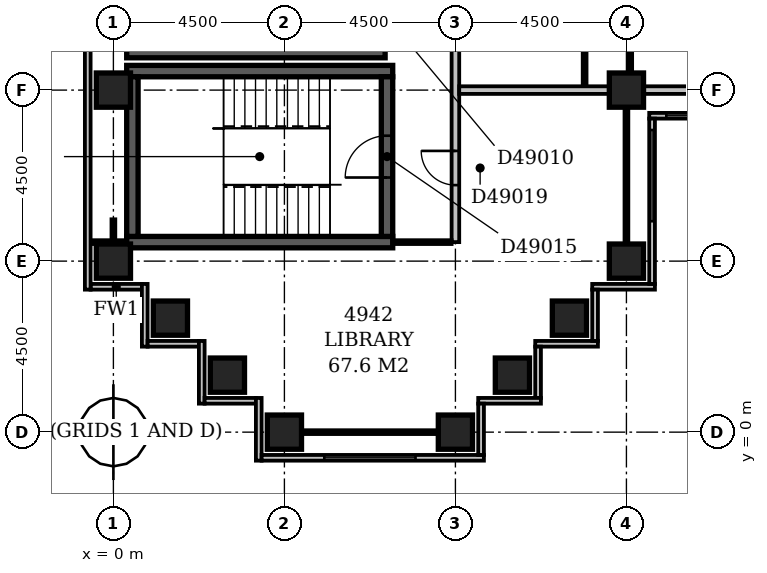
"""IFC4 building model, lengths in metres.
Left out: names, types, materials, properties, quantities, classifications, styles, units other than length and angle.
Written with IfcOpenShell. Run it as: python <this file> out.ifc"""

import sys

from ifc_helpers import new_model, si_unit, direction, frame, frame_2d, origin, origin_2d, place, context, subcontext, project, spatial, rectangle, extrude, element, fill, save


model = new_model("IFC4")
c1 = context("Model", 3, precision=1e-05, world=origin(), true_north=direction((0.0, 1.0)))
c2 = subcontext(c1, "Body", "Model", "MODEL_VIEW")
j1 = project(units=[si_unit("LENGTHUNIT", "METRE"), si_unit("PLANEANGLEUNIT", "RADIAN")], contexts=[c1])
p1 = place(None, origin())
s1 = spatial("IfcSite", under=j1, at=p1, CompositionType="ELEMENT")
p2 = place(p1, origin())
s2 = spatial("IfcBuilding", under=s1, at=p2, CompositionType="ELEMENT")
p3 = place(p2, frame((0.0, 0.0, 193.4)))
s3 = spatial("IfcBuildingStorey", under=s2, at=p3, CompositionType="ELEMENT", Elevation=193.4)
for number, where, z_axis, x_axis in (
    (1, (0.35, 5.0, -0.3), (0.0, 0.0, 1.0), (1.0, 0.0, 0.0)),
    (2, (0.35, 9.5, -0.3), (0.0, 0.0, 1.0), (1.0, 0.0, 0.0)),
):
    element("IfcWall", number, at=place(p3, frame(where, z_axis=z_axis, x_axis=x_axis)), inside=s3, PredefinedType="SHEAR", context=c2, shape_type="SweptSolid", body=[
        extrude(rectangle(XDim=7.0, YDim=0.3, at=frame_2d((3.5, 0.0))), origin(), (0.0, 0.0, 1.0), 3.6),
    ])
p4 = place(p3, frame((0.35, 10.0, -0.3), z_axis=(0.0, 0.0, 1.0), x_axis=(1.0, 0.0, 0.0)))
e3 = element("IfcWall", 3, at=p4, inside=s3, PredefinedType="SHEAR", context=c2, shape_type="SweptSolid", body=[
    extrude(rectangle(XDim=6.8, YDim=0.3, at=frame_2d((3.4, 0.0))), origin(), (0.0, 0.0, 1.0), 3.6),
])
p5 = place(p3, frame((0.5, 5.15, -0.3), z_axis=(0.0, 0.0, 1.0), x_axis=(0.0, 1.0, 0.0)))
e4 = element("IfcWall", 4, at=p5, inside=s3, PredefinedType="SHEAR", context=c2, shape_type="SweptSolid", body=[
    extrude(rectangle(XDim=4.2, YDim=0.3, at=frame_2d((2.1, 0.0))), origin(), (0.0, 0.0, 1.0), 3.6),
])
p6 = place(p3, frame((7.2, 5.15, -0.3), z_axis=(0.0, 0.0, 1.0), x_axis=(0.0, 1.0, 0.0)))
e5 = element("IfcWall", 5, at=p6, inside=s3, PredefinedType="SHEAR", context=c2, shape_type="SweptSolid", body=[
    extrude(rectangle(XDim=4.2, YDim=0.3, at=frame_2d((2.1, 0.0))), origin(), (0.0, 0.0, 1.0), 3.6),
])
p7 = place(p6, frame((1.55, 0.0, 0.3)))
e6 = element("IfcOpeningElement", 6, at=p7, cuts=e5, PredefinedType="OPENING", context=c2, shape_type="SweptSolid", body=[
    extrude(rectangle(XDim=1.1, YDim=2.1, at=frame_2d((0.55, 1.05))), frame((0.0, 0.162, 0.0), z_axis=(0.0, -1.0, 0.0), x_axis=(1.0, 0.0, 0.0)), (0.0, 0.0, 1.0), 0.324),
])
for number, where, z_axis, x_axis in (
    (7, (4.5, 0.0, -0.3), (0.0, 0.0, 1.0), (1.0, 0.0, 0.0)),
    (8, (9.0, 0.0, -0.3), (0.0, 0.0, 1.0), (1.0, 0.0, 0.0)),
    (9, (3.0, 1.5, -0.3), (0.0, 0.0, 1.0), (1.0, 0.0, 0.0)),
    (10, (10.5, 1.5, -0.3), (0.0, 0.0, 1.0), (1.0, 0.0, 0.0)),
    (11, (1.5, 3.0, -0.3), (0.0, 0.0, 1.0), (1.0, 0.0, 0.0)),
    (12, (12.0, 3.0, -0.3), (0.0, 0.0, 1.0), (1.0, 0.0, 0.0)),
    (13, (0.0, 4.5, -0.3), (0.0, 0.0, 1.0), (1.0, 0.0, 0.0)),
    (14, (13.5, 4.5, -0.3), (0.0, 0.0, 1.0), (1.0, 0.0, 0.0)),
    (15, (0.0, 9.0, -0.3), (0.0, 0.0, 1.0), (1.0, 0.0, 0.0)),
    (16, (13.5, 9.0, -0.3), (0.0, 0.0, 1.0), (1.0, 0.0, 0.0)),
):
    element("IfcColumn", number, at=place(p3, frame(where, z_axis=z_axis, x_axis=x_axis)), inside=s3, PredefinedType="COLUMN", context=c2, shape_type="SweptSolid", body=[
        extrude(rectangle(XDim=0.9, YDim=0.9, at=origin_2d()), origin(), (0.0, 0.0, 1.0), 3.6),
    ])
p8 = place(p3, frame((-0.6, 3.825, 0.0), z_axis=(0.0, 0.0, 1.0), x_axis=(1.0, 0.0, 0.0)))
e17 = element("IfcWall", 17, at=p8, inside=s3, PredefinedType="STANDARD", context=c2, shape_type="SweptSolid", body=[
    extrude(rectangle(XDim=1.35, YDim=0.15, at=frame_2d((0.675, 0.0))), origin(), (0.0, 0.0, 1.0), 2.7),
])
p9 = place(p3, frame((0.825, 3.9, 0.0), z_axis=(0.0, 0.0, 1.0), x_axis=(0.0, -1.0, 0.0)))
e18 = element("IfcWall", 18, at=p9, inside=s3, PredefinedType="STANDARD", context=c2, shape_type="SweptSolid", body=[
    extrude(rectangle(XDim=1.65, YDim=0.15, at=frame_2d((0.825, 0.0))), origin(), (0.0, 0.0, 1.0), 2.7),
])
p10 = place(p3, frame((0.9, 2.325, 0.0), z_axis=(0.0, 0.0, 1.0), x_axis=(1.0, 0.0, 0.0)))
e19 = element("IfcWall", 19, at=p10, inside=s3, PredefinedType="STANDARD", context=c2, shape_type="SweptSolid", body=[
    extrude(rectangle(XDim=1.35, YDim=0.15, at=frame_2d((0.675, 0.0))), origin(), (0.0, 0.0, 1.0), 2.7),
])
p11 = place(p3, frame((2.325, 2.4, 0.0), z_axis=(0.0, 0.0, 1.0), x_axis=(0.0, -1.0, 0.0)))
e20 = element("IfcWall", 20, at=p11, inside=s3, PredefinedType="STANDARD", context=c2, shape_type="SweptSolid", body=[
    extrude(rectangle(XDim=1.65, YDim=0.15, at=frame_2d((0.825, 0.0))), origin(), (0.0, 0.0, 1.0), 2.7),
])
p12 = place(p3, frame((2.4, 0.825, 0.0), z_axis=(0.0, 0.0, 1.0), x_axis=(1.0, 0.0, 0.0)))
e21 = element("IfcWall", 21, at=p12, inside=s3, PredefinedType="STANDARD", context=c2, shape_type="SweptSolid", body=[
    extrude(rectangle(XDim=1.35, YDim=0.15, at=frame_2d((0.675, 0.0))), origin(), (0.0, 0.0, 1.0), 2.7),
])
p13 = place(p3, frame((3.825, 0.9, 0.0), z_axis=(0.0, 0.0, 1.0), x_axis=(0.0, -1.0, 0.0)))
e22 = element("IfcWall", 22, at=p13, inside=s3, PredefinedType="STANDARD", context=c2, shape_type="SweptSolid", body=[
    extrude(rectangle(XDim=1.65, YDim=0.15, at=frame_2d((0.825, 0.0))), origin(), (0.0, 0.0, 1.0), 2.7),
])
p14 = place(p3, frame((3.9, -0.675, 0.0), z_axis=(0.0, 0.0, 1.0), x_axis=(1.0, 0.0, 0.0)))
e23 = element("IfcWall", 23, at=p14, inside=s3, PredefinedType="STANDARD", context=c2, shape_type="SweptSolid", body=[
    extrude(rectangle(XDim=5.85, YDim=0.15, at=frame_2d((2.925, 0.0))), origin(), (0.0, 0.0, 1.0), 2.7),
])
p15 = place(p14, frame((1.65, 0.0, 0.6)))
e24 = element("IfcOpeningElement", 24, at=p15, cuts=e23, PredefinedType="OPENING", context=c2, shape_type="SweptSolid", body=[
    extrude(rectangle(XDim=2.4, YDim=1.8, at=frame_2d((1.2, 0.9))), frame((0.0, 0.087, 0.0), z_axis=(0.0, -1.0, 0.0), x_axis=(1.0, 0.0, 0.0)), (0.0, 0.0, 1.0), 0.174),
])
p16 = place(p3, frame((9.675, -0.6, 0.0), z_axis=(0.0, 0.0, 1.0), x_axis=(0.0, 1.0, 0.0)))
e25 = element("IfcWall", 25, at=p16, inside=s3, PredefinedType="STANDARD", context=c2, shape_type="SweptSolid", body=[
    extrude(rectangle(XDim=1.35, YDim=0.15, at=frame_2d((0.675, 0.0))), origin(), (0.0, 0.0, 1.0), 2.7),
])
p17 = place(p3, frame((9.6, 0.825, 0.0), z_axis=(0.0, 0.0, 1.0), x_axis=(1.0, 0.0, 0.0)))
e26 = element("IfcWall", 26, at=p17, inside=s3, PredefinedType="STANDARD", context=c2, shape_type="SweptSolid", body=[
    extrude(rectangle(XDim=1.65, YDim=0.15, at=frame_2d((0.825, 0.0))), origin(), (0.0, 0.0, 1.0), 2.7),
])
p18 = place(p3, frame((11.175, 0.9, 0.0), z_axis=(0.0, 0.0, 1.0), x_axis=(0.0, 1.0, 0.0)))
e27 = element("IfcWall", 27, at=p18, inside=s3, PredefinedType="STANDARD", context=c2, shape_type="SweptSolid", body=[
    extrude(rectangle(XDim=1.35, YDim=0.15, at=frame_2d((0.675, 0.0))), origin(), (0.0, 0.0, 1.0), 2.7),
])
p19 = place(p3, frame((11.1, 2.325, 0.0), z_axis=(0.0, 0.0, 1.0), x_axis=(1.0, 0.0, 0.0)))
e28 = element("IfcWall", 28, at=p19, inside=s3, PredefinedType="STANDARD", context=c2, shape_type="SweptSolid", body=[
    extrude(rectangle(XDim=1.65, YDim=0.15, at=frame_2d((0.825, 0.0))), origin(), (0.0, 0.0, 1.0), 2.7),
])
p20 = place(p3, frame((12.675, 2.4, 0.0), z_axis=(0.0, 0.0, 1.0), x_axis=(0.0, 1.0, 0.0)))
e29 = element("IfcWall", 29, at=p20, inside=s3, PredefinedType="STANDARD", context=c2, shape_type="SweptSolid", body=[
    extrude(rectangle(XDim=1.35, YDim=0.15, at=frame_2d((0.675, 0.0))), origin(), (0.0, 0.0, 1.0), 2.7),
])
p21 = place(p3, frame((12.6, 3.825, 0.0), z_axis=(0.0, 0.0, 1.0), x_axis=(1.0, 0.0, 0.0)))
e30 = element("IfcWall", 30, at=p21, inside=s3, PredefinedType="STANDARD", context=c2, shape_type="SweptSolid", body=[
    extrude(rectangle(XDim=1.65, YDim=0.15, at=frame_2d((0.825, 0.0))), origin(), (0.0, 0.0, 1.0), 2.7),
])
p22 = place(p3, frame((14.175, 3.9, 0.0), z_axis=(0.0, 0.0, 1.0), x_axis=(0.0, 1.0, 0.0)))
e31 = element("IfcWall", 31, at=p22, inside=s3, PredefinedType="STANDARD", context=c2, shape_type="SweptSolid", body=[
    extrude(rectangle(XDim=4.35, YDim=0.15, at=frame_2d((2.175, 0.0))), origin(), (0.0, 0.0, 1.0), 2.7),
])
p23 = place(p22, frame((1.65, 0.0, 0.6)))
e32 = element("IfcOpeningElement", 32, at=p23, cuts=e31, PredefinedType="OPENING", context=c2, shape_type="SweptSolid", body=[
    extrude(rectangle(XDim=2.4, YDim=1.8, at=frame_2d((1.2, 0.9))), frame((0.0, 0.087, 0.0), z_axis=(0.0, -1.0, 0.0), x_axis=(1.0, 0.0, 0.0)), (0.0, 0.0, 1.0), 0.174),
])
p24 = place(p3, frame((14.1, 8.325, 0.0), z_axis=(0.0, 0.0, 1.0), x_axis=(1.0, 0.0, 0.0)))
e33 = element("IfcWall", 33, at=p24, inside=s3, PredefinedType="STANDARD", context=c2, shape_type="SweptSolid", body=[
    extrude(rectangle(XDim=4.65, YDim=0.15, at=frame_2d((2.325, 0.0))), origin(), (0.0, 0.0, 1.0), 2.7),
])
p25 = place(p24, frame((0.45, 0.0, 0.6)))
e34 = element("IfcOpeningElement", 34, at=p25, cuts=e33, PredefinedType="OPENING", context=c2, shape_type="SweptSolid", body=[
    extrude(rectangle(XDim=2.4, YDim=1.8, at=frame_2d((1.2, 0.9))), frame((0.0, 0.087, 0.0), z_axis=(0.0, -1.0, 0.0), x_axis=(1.0, 0.0, 0.0)), (0.0, 0.0, 1.0), 0.174),
])
p26 = place(p3, frame((-0.675, 59.1, 0.0), z_axis=(0.0, 0.0, 1.0), x_axis=(0.0, -1.0, 0.0)))
e35 = element("IfcWall", 35, at=p26, inside=s3, PredefinedType="STANDARD", context=c2, shape_type="SweptSolid", body=[
    extrude(rectangle(XDim=55.35, YDim=0.15, at=frame_2d((27.675, 0.0))), origin(), (0.0, 0.0, 1.0), 2.7),
])
p27 = place(p3, frame((4.95, 0.0, 0.0), z_axis=(0.0, 0.0, 1.0), x_axis=(1.0, 0.0, 0.0)))
e36 = element("IfcWall", 36, at=p27, inside=s3, PredefinedType="PARTITIONING", context=c2, shape_type="SweptSolid", body=[
    extrude(rectangle(XDim=3.6, YDim=0.1, at=frame_2d((1.8, 0.0))), origin(), (0.0, 0.0, 1.0), 2.7),
])
p28 = place(p3, frame((0.0, 4.95, 0.0), z_axis=(0.0, 0.0, 1.0), x_axis=(0.0, 1.0, 0.0)))
e37 = element("IfcWall", 37, at=p28, inside=s3, PredefinedType="PARTITIONING", context=c2, shape_type="SweptSolid", body=[
    extrude(rectangle(XDim=0.65, YDim=0.1, at=frame_2d((0.325, 0.0))), origin(), (0.0, 0.0, 1.0), 2.7),
])
p29 = place(p3, frame((13.5, 4.95, 0.0), z_axis=(0.0, 0.0, 1.0), x_axis=(0.0, 1.0, 0.0)))
e38 = element("IfcWall", 38, at=p29, inside=s3, PredefinedType="PARTITIONING", context=c2, shape_type="SweptSolid", body=[
    extrude(rectangle(XDim=3.6, YDim=0.1, at=frame_2d((1.8, 0.0))), origin(), (0.0, 0.0, 1.0), 2.7),
])
p30 = place(p3, frame((-0.6, 5.0, 0.0), z_axis=(0.0, 0.0, 1.0), x_axis=(1.0, 0.0, 0.0)))
e39 = element("IfcWall", 39, at=p30, inside=s3, PredefinedType="PARTITIONING", context=c2, shape_type="SweptSolid", body=[
    extrude(rectangle(XDim=0.951, YDim=0.1, at=frame_2d((0.476, 0.0))), origin(), (0.0, 0.0, 1.0), 3.3),
])
p31 = place(p3, frame((7.349, 5.0, 0.0), z_axis=(0.0, 0.0, 1.0), x_axis=(1.0, 0.0, 0.0)))
e40 = element("IfcWall", 40, at=p31, inside=s3, PredefinedType="PARTITIONING", context=c2, shape_type="SweptSolid", body=[
    extrude(rectangle(XDim=1.551, YDim=0.1, at=frame_2d((0.775, 0.0))), origin(), (0.0, 0.0, 1.0), 3.3),
])
p32 = place(p3, frame((9.0, 5.0, 0.0), z_axis=(0.0, 0.0, 1.0), x_axis=(0.0, 1.0, 0.0)))
e41 = element("IfcWall", 41, at=p32, inside=s3, PredefinedType="PARTITIONING", context=c2, shape_type="SweptSolid", body=[
    extrude(rectangle(XDim=31.0, YDim=0.2, at=frame_2d((15.5, 0.0))), origin(), (0.0, 0.0, 1.0), 3.3),
])
p33 = place(p32, frame((17.8, 0.0, 0.0)))
e42 = element("IfcOpeningElement", 42, at=p33, cuts=e41, PredefinedType="OPENING", context=c2, shape_type="SweptSolid", body=[
    extrude(rectangle(XDim=1.0, YDim=2.1, at=frame_2d((0.5, 1.05))), frame((0.0, 0.112, 0.0), z_axis=(0.0, -1.0, 0.0), x_axis=(1.0, 0.0, 0.0)), (0.0, 0.0, 1.0), 0.224),
])
p34 = place(p32, frame((14.95, 0.0, 0.0)))
e43 = element("IfcOpeningElement", 43, at=p34, cuts=e41, PredefinedType="OPENING", context=c2, shape_type="SweptSolid", body=[
    extrude(rectangle(XDim=1.0, YDim=2.1, at=frame_2d((0.5, 1.05))), frame((0.0, 0.112, 0.0), z_axis=(0.0, -1.0, 0.0), x_axis=(1.0, 0.0, 0.0)), (0.0, 0.0, 1.0), 0.224),
])
p35 = place(p32, frame((9.3, 0.0, 0.0)))
e44 = element("IfcOpeningElement", 44, at=p35, cuts=e41, PredefinedType="OPENING", context=c2, shape_type="SweptSolid", body=[
    extrude(rectangle(XDim=1.0, YDim=2.1, at=frame_2d((0.5, 1.05))), frame((0.0, 0.112, 0.0), z_axis=(0.0, -1.0, 0.0), x_axis=(1.0, 0.0, 0.0)), (0.0, 0.0, 1.0), 0.224),
])
p36 = place(p32, frame((1.5, 0.0, 0.0)))
e45 = element("IfcOpeningElement", 45, at=p36, cuts=e41, PredefinedType="OPENING", context=c2, shape_type="SweptSolid", body=[
    extrude(rectangle(XDim=0.9, YDim=2.1, at=frame_2d((0.45, 1.05))), frame((0.0, 0.112, 0.0), z_axis=(0.0, -1.0, 0.0), x_axis=(1.0, 0.0, 0.0)), (0.0, 0.0, 1.0), 0.224),
])
p37 = place(p3, frame((9.1, 9.0, 0.0), z_axis=(0.0, 0.0, 1.0), x_axis=(1.0, 0.0, 0.0)))
e46 = element("IfcWall", 46, at=p37, inside=s3, PredefinedType="PARTITIONING", context=c2, shape_type="SweptSolid", body=[
    extrude(rectangle(XDim=3.95, YDim=0.2, at=frame_2d((1.975, 0.0))), origin(), (0.0, 0.0, 1.0), 3.3),
])
p38 = place(p3, frame((13.95, 9.0, 0.0), z_axis=(0.0, 0.0, 1.0), x_axis=(1.0, 0.0, 0.0)))
e47 = element("IfcWall", 47, at=p38, inside=s3, PredefinedType="PARTITIONING", context=c2, shape_type="SweptSolid", body=[
    extrude(rectangle(XDim=3.6, YDim=0.2, at=frame_2d((1.8, 0.0))), origin(), (0.0, 0.0, 1.0), 2.7),
])
p39 = place(p3, frame((12.4, 9.1, 0.0), z_axis=(0.0, 0.0, 1.0), x_axis=(0.0, 1.0, 0.0)))
e48 = element("IfcWall", 48, at=p39, inside=s3, PredefinedType="PARTITIONING", context=c2, shape_type="SweptSolid", body=[
    extrude(rectangle(XDim=4.9, YDim=0.1, at=frame_2d((2.45, 0.0))), origin(), (0.0, 0.0, 1.0), 3.3),
])
p40 = place(p39, frame((1.95, 0.0, 0.0)))
e49 = element("IfcOpeningElement", 49, at=p40, cuts=e48, PredefinedType="OPENING", context=c2, shape_type="SweptSolid", body=[
    extrude(rectangle(XDim=0.9, YDim=2.1, at=frame_2d((0.45, 1.05))), frame((0.0, 0.062, 0.0), z_axis=(0.0, -1.0, 0.0), x_axis=(1.0, 0.0, 0.0)), (0.0, 0.0, 1.0), 0.124),
])
p41 = place(p3, frame((13.6, 9.45, 0.0), z_axis=(0.0, 0.0, 1.0), x_axis=(0.0, 1.0, 0.0)))
e50 = element("IfcWall", 50, at=p41, inside=s3, PredefinedType="PARTITIONING", context=c2, shape_type="SweptSolid", body=[
    extrude(rectangle(XDim=8.45, YDim=0.1, at=frame_2d((4.225, 0.0))), origin(), (0.0, 0.0, 1.0), 3.3),
])
p42 = place(p41, frame((1.35, 0.0, 0.0)))
e51 = element("IfcOpeningElement", 51, at=p42, cuts=e50, PredefinedType="OPENING", context=c2, shape_type="SweptSolid", body=[
    extrude(rectangle(XDim=0.9, YDim=2.1, at=frame_2d((0.45, 1.05))), frame((0.0, 0.062, 0.0), z_axis=(0.0, -1.0, 0.0), x_axis=(1.0, 0.0, 0.0)), (0.0, 0.0, 1.0), 0.124),
])
p43 = place(p41, frame((5.85, 0.0, 0.0)))
e52 = element("IfcOpeningElement", 52, at=p43, cuts=e50, PredefinedType="OPENING", context=c2, shape_type="SweptSolid", body=[
    extrude(rectangle(XDim=0.9, YDim=2.1, at=frame_2d((0.45, 1.05))), frame((0.0, 0.062, 0.0), z_axis=(0.0, -1.0, 0.0), x_axis=(1.0, 0.0, 0.0)), (0.0, 0.0, 1.0), 0.124),
])
p44 = place(p15, origin())
e53 = element("IfcWindow", 53, at=p44, inside=s3, PartitioningType="SINGLE_PANEL", PredefinedType="WINDOW", context=c2, shape_type="SweptSolid", body=[
    extrude(rectangle(XDim=2.4, YDim=1.8, at=frame_2d((1.2, 0.9))), frame((0.0, 0.03, 0.0), z_axis=(0.0, -1.0, 0.0), x_axis=(1.0, 0.0, 0.0)), (0.0, 0.0, 1.0), 0.06),
])
fill(e24, e53)
p45 = place(p23, origin())
e54 = element("IfcWindow", 54, at=p45, inside=s3, PartitioningType="SINGLE_PANEL", PredefinedType="WINDOW", context=c2, shape_type="SweptSolid", body=[
    extrude(rectangle(XDim=2.4, YDim=1.8, at=frame_2d((1.2, 0.9))), frame((0.0, 0.03, 0.0), z_axis=(0.0, -1.0, 0.0), x_axis=(1.0, 0.0, 0.0)), (0.0, 0.0, 1.0), 0.06),
])
fill(e32, e54)
p46 = place(p25, origin())
e55 = element("IfcWindow", 55, at=p46, inside=s3, PartitioningType="SINGLE_PANEL", PredefinedType="WINDOW", context=c2, shape_type="SweptSolid", body=[
    extrude(rectangle(XDim=2.4, YDim=1.8, at=frame_2d((1.2, 0.9))), frame((0.0, 0.03, 0.0), z_axis=(0.0, -1.0, 0.0), x_axis=(1.0, 0.0, 0.0)), (0.0, 0.0, 1.0), 0.06),
])
fill(e34, e55)
p47 = place(p7, origin())
e56 = element("IfcDoor", 56, at=p47, inside=s3, OperationType="SINGLE_SWING_LEFT", PredefinedType="DOOR", context=c2, shape_type="SweptSolid", body=[
    extrude(rectangle(XDim=1.1, YDim=2.1, at=frame_2d((0.55, 1.05))), frame((0.0, 0.025, 0.0), z_axis=(0.0, -1.0, 0.0), x_axis=(1.0, 0.0, 0.0)), (0.0, 0.0, 1.0), 0.05),
])
fill(e6, e56)
p48 = place(p36, frame((0.9, 0.0, 0.0), z_axis=(0.0, 0.0, 1.0), x_axis=(-1.0, 0.0, 0.0)))
e57 = element("IfcDoor", 57, at=p48, inside=s3, OperationType="SINGLE_SWING_LEFT", PredefinedType="DOOR", context=c2, shape_type="SweptSolid", body=[
    extrude(rectangle(XDim=0.9, YDim=2.1, at=frame_2d((0.45, 1.05))), frame((0.0, 0.025, 0.0), z_axis=(0.0, -1.0, 0.0), x_axis=(1.0, 0.0, 0.0)), (0.0, 0.0, 1.0), 0.05),
])
fill(e45, e57)
save(model, sys.argv[1])
